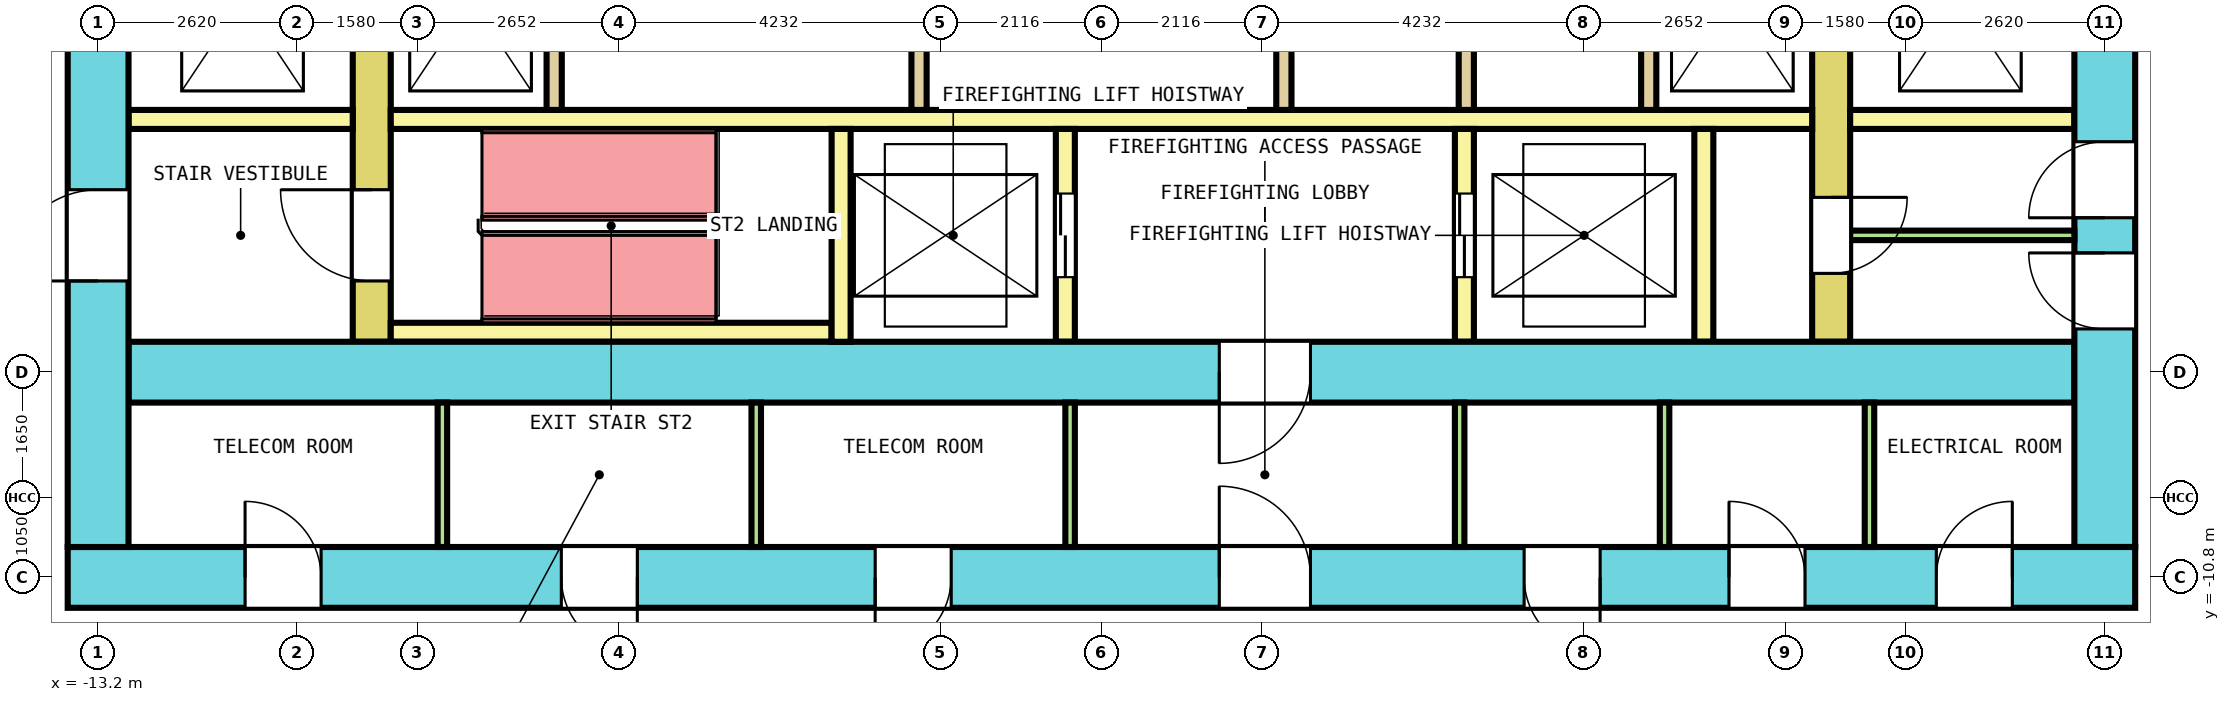
"""IFC4 building model, lengths in metres.
Left out: names, types, materials, properties, quantities, classifications, styles, units other than length and angle.
Written with IfcOpenShell. Run it as: python <this file> out.ifc"""

import sys

from ifc_helpers import new_model, si_unit, direction, frame, frame_2d, origin, place, context, subcontext, project, spatial, rectangle, extrude, element, fill, save


model = new_model("IFC4")
c1 = context("Model", 3, precision=1e-05, world=origin(), true_north=direction((0.0, 1.0)))
c2 = subcontext(c1, "Body", "Model", "MODEL_VIEW")
j1 = project(units=[si_unit("LENGTHUNIT", "METRE"), si_unit("PLANEANGLEUNIT", "RADIAN")], contexts=[c1])
p1 = place(None, origin())
s1 = spatial("IfcSite", under=j1, at=p1, CompositionType="ELEMENT")
p2 = place(p1, origin())
s2 = spatial("IfcBuilding", under=s1, at=p2, CompositionType="ELEMENT")
p3 = place(p2, frame((0.0, 0.0, 89.6)))
s3 = spatial("IfcBuildingStorey", under=s2, at=p3, CompositionType="ELEMENT", Elevation=89.6)
p4 = place(p3, frame((-13.6, -10.8, 0.0), z_axis=(0.0, 0.0, 1.0), x_axis=(1.0, 0.0, 0.0)))
e1 = element("IfcWall", 1, at=p4, inside=s3, PredefinedType="SHEAR", context=c2, shape_type="SweptSolid", body=[
    extrude(rectangle(XDim=27.2, YDim=0.8, at=frame_2d((13.6, 0.0))), origin(), (0.0, 0.0, 1.0), 4.1),
])
p5 = place(p4, frame((2.333, 0.0, 0.0)))
e2 = element("IfcOpeningElement", 2, at=p5, cuts=e1, PredefinedType="OPENING", context=c2, shape_type="SweptSolid", body=[
    extrude(rectangle(XDim=1.0, YDim=2.1, at=frame_2d((0.5, 1.05))), frame((0.0, 0.41, 0.0), z_axis=(0.0, -1.0, 0.0), x_axis=(1.0, 0.0, 0.0)), (0.0, 0.0, 1.0), 0.82),
])
p6 = place(p4, frame((6.494, 0.0, 0.0)))
e3 = element("IfcOpeningElement", 3, at=p6, cuts=e1, PredefinedType="OPENING", context=c2, shape_type="SweptSolid", body=[
    extrude(rectangle(XDim=1.0, YDim=2.1, at=frame_2d((0.5, 1.05))), frame((0.0, 0.41, 0.0), z_axis=(0.0, -1.0, 0.0), x_axis=(1.0, 0.0, 0.0)), (0.0, 0.0, 1.0), 0.82),
])
p7 = place(p4, frame((10.623, 0.0, 0.0)))
e4 = element("IfcOpeningElement", 4, at=p7, cuts=e1, PredefinedType="OPENING", context=c2, shape_type="SweptSolid", body=[
    extrude(rectangle(XDim=1.0, YDim=2.1, at=frame_2d((0.5, 1.05))), frame((0.0, 0.41, 0.0), z_axis=(0.0, -1.0, 0.0), x_axis=(1.0, 0.0, 0.0)), (0.0, 0.0, 1.0), 0.82),
])
p8 = place(p4, frame((19.16, 0.0, 0.0)))
e5 = element("IfcOpeningElement", 5, at=p8, cuts=e1, PredefinedType="OPENING", context=c2, shape_type="SweptSolid", body=[
    extrude(rectangle(XDim=1.0, YDim=2.1, at=frame_2d((0.5, 1.05))), frame((0.0, 0.41, 0.0), z_axis=(0.0, -1.0, 0.0), x_axis=(1.0, 0.0, 0.0)), (0.0, 0.0, 1.0), 0.82),
])
p9 = place(p4, frame((21.856, 0.0, 0.0)))
e6 = element("IfcOpeningElement", 6, at=p9, cuts=e1, PredefinedType="OPENING", context=c2, shape_type="SweptSolid", body=[
    extrude(rectangle(XDim=1.0, YDim=2.1, at=frame_2d((0.5, 1.05))), frame((0.0, 0.41, 0.0), z_axis=(0.0, -1.0, 0.0), x_axis=(1.0, 0.0, 0.0)), (0.0, 0.0, 1.0), 0.82),
])
p10 = place(p4, frame((24.583, 0.0, 0.0)))
e7 = element("IfcOpeningElement", 7, at=p10, cuts=e1, PredefinedType="OPENING", context=c2, shape_type="SweptSolid", body=[
    extrude(rectangle(XDim=1.0, YDim=2.1, at=frame_2d((0.5, 1.05))), frame((0.0, 0.41, 0.0), z_axis=(0.0, -1.0, 0.0), x_axis=(1.0, 0.0, 0.0)), (0.0, 0.0, 1.0), 0.82),
])
p11 = place(p4, frame((15.15, 0.0, 0.0)))
e8 = element("IfcOpeningElement", 8, at=p11, cuts=e1, PredefinedType="OPENING", context=c2, shape_type="SweptSolid", body=[
    extrude(rectangle(XDim=1.2, YDim=2.1, at=frame_2d((0.6, 1.05))), frame((0.0, 0.41, 0.0), z_axis=(0.0, -1.0, 0.0), x_axis=(1.0, 0.0, 0.0)), (0.0, 0.0, 1.0), 0.82),
])
p12 = place(p3, frame((-13.2, -10.4, 0.0), z_axis=(0.0, 0.0, 1.0), x_axis=(0.0, 1.0, 0.0)))
e9 = element("IfcWall", 9, at=p12, inside=s3, PredefinedType="SHEAR", context=c2, shape_type="SweptSolid", body=[
    extrude(rectangle(XDim=20.8, YDim=0.8, at=frame_2d((10.4, 0.0))), origin(), (0.0, 0.0, 1.0), 4.1),
])
p13 = place(p12, frame((9.2, 0.0, 0.0)))
e10 = element("IfcOpeningElement", 10, at=p13, cuts=e9, PredefinedType="OPENING", context=c2, shape_type="SweptSolid", body=[
    extrude(rectangle(XDim=2.4, YDim=2.1, at=frame_2d((1.2, 1.05))), frame((0.0, 0.41, 0.0), z_axis=(0.0, -1.0, 0.0), x_axis=(1.0, 0.0, 0.0)), (0.0, 0.0, 1.0), 0.82),
])
p14 = place(p12, frame((16.1, 0.0, 0.0)))
e11 = element("IfcOpeningElement", 11, at=p14, cuts=e9, PredefinedType="OPENING", context=c2, shape_type="SweptSolid", body=[
    extrude(rectangle(XDim=1.2, YDim=2.1, at=frame_2d((0.6, 1.05))), frame((0.0, 0.41, 0.0), z_axis=(0.0, -1.0, 0.0), x_axis=(1.0, 0.0, 0.0)), (0.0, 0.0, 1.0), 0.82),
])
p15 = place(p12, frame((3.5, 0.0, 0.0)))
e12 = element("IfcOpeningElement", 12, at=p15, cuts=e9, PredefinedType="OPENING", context=c2, shape_type="SweptSolid", body=[
    extrude(rectangle(XDim=1.2, YDim=2.1, at=frame_2d((0.6, 1.05))), frame((0.0, 0.41, 0.0), z_axis=(0.0, -1.0, 0.0), x_axis=(1.0, 0.0, 0.0)), (0.0, 0.0, 1.0), 0.82),
])
p16 = place(p3, frame((13.2, -10.4, 0.0), z_axis=(0.0, 0.0, 1.0), x_axis=(0.0, 1.0, 0.0)))
e13 = element("IfcWall", 13, at=p16, inside=s3, PredefinedType="SHEAR", context=c2, shape_type="SweptSolid", body=[
    extrude(rectangle(XDim=20.8, YDim=0.8, at=frame_2d((10.4, 0.0))), origin(), (0.0, 0.0, 1.0), 4.1),
])
p17 = place(p16, frame((9.2, 0.0, 0.0)))
e14 = element("IfcOpeningElement", 14, at=p17, cuts=e13, PredefinedType="OPENING", context=c2, shape_type="SweptSolid", body=[
    extrude(rectangle(XDim=2.4, YDim=2.1, at=frame_2d((1.2, 1.05))), frame((0.0, 0.41, 0.0), z_axis=(0.0, -1.0, 0.0), x_axis=(1.0, 0.0, 0.0)), (0.0, 0.0, 1.0), 0.82),
])
p18 = place(p16, frame((16.1, 0.0, 0.0)))
e15 = element("IfcOpeningElement", 15, at=p18, cuts=e13, PredefinedType="OPENING", context=c2, shape_type="SweptSolid", body=[
    extrude(rectangle(XDim=1.2, YDim=2.1, at=frame_2d((0.6, 1.05))), frame((0.0, 0.41, 0.0), z_axis=(0.0, -1.0, 0.0), x_axis=(1.0, 0.0, 0.0)), (0.0, 0.0, 1.0), 0.82),
])
p19 = place(p16, frame((2.869, 0.0, 0.0)))
e16 = element("IfcOpeningElement", 16, at=p19, cuts=e13, PredefinedType="OPENING", context=c2, shape_type="SweptSolid", body=[
    extrude(rectangle(XDim=1.0, YDim=2.1, at=frame_2d((0.5, 1.05))), frame((0.0, 0.41, 0.0), z_axis=(0.0, -1.0, 0.0), x_axis=(1.0, 0.0, 0.0)), (0.0, 0.0, 1.0), 0.82),
])
p20 = place(p16, frame((4.331, 0.0, 0.0)))
e17 = element("IfcOpeningElement", 17, at=p20, cuts=e13, PredefinedType="OPENING", context=c2, shape_type="SweptSolid", body=[
    extrude(rectangle(XDim=1.0, YDim=2.1, at=frame_2d((0.5, 1.05))), frame((0.0, 0.41, 0.0), z_axis=(0.0, -1.0, 0.0), x_axis=(1.0, 0.0, 0.0)), (0.0, 0.0, 1.0), 0.82),
])
p21 = place(p3, frame((-12.8, -8.1, 0.0), z_axis=(0.0, 0.0, 1.0), x_axis=(1.0, 0.0, 0.0)))
e18 = element("IfcWall", 18, at=p21, inside=s3, PredefinedType="SHEAR", context=c2, shape_type="SweptSolid", body=[
    extrude(rectangle(XDim=25.6, YDim=0.8, at=frame_2d((12.8, 0.0))), origin(), (0.0, 0.0, 1.0), 4.1),
])
p22 = place(p21, frame((14.35, 0.0, 0.0)))
e19 = element("IfcOpeningElement", 19, at=p22, cuts=e18, PredefinedType="OPENING", context=c2, shape_type="SweptSolid", body=[
    extrude(rectangle(XDim=1.2, YDim=2.1, at=frame_2d((0.6, 1.05))), frame((0.0, 0.41, 0.0), z_axis=(0.0, -1.0, 0.0), x_axis=(1.0, 0.0, 0.0)), (0.0, 0.0, 1.0), 0.82),
])
p23 = place(p3, frame((-9.6, -7.7, 0.0), z_axis=(0.0, 0.0, 1.0), x_axis=(0.0, 1.0, 0.0)))
e20 = element("IfcWall", 20, at=p23, inside=s3, PredefinedType="SHEAR", context=c2, shape_type="SweptSolid", body=[
    extrude(rectangle(XDim=15.4, YDim=0.5, at=frame_2d((7.7, 0.0))), origin(), (0.0, 0.0, 1.0), 4.1),
])
p24 = place(p23, frame((6.5, 0.0, 0.0)))
e21 = element("IfcOpeningElement", 21, at=p24, cuts=e20, PredefinedType="OPENING", context=c2, shape_type="SweptSolid", body=[
    extrude(rectangle(XDim=2.4, YDim=2.1, at=frame_2d((1.2, 1.05))), frame((0.0, 0.26, 0.0), z_axis=(0.0, -1.0, 0.0), x_axis=(1.0, 0.0, 0.0)), (0.0, 0.0, 1.0), 0.52),
])
p25 = place(p23, frame((13.4, 0.0, 0.0)))
e22 = element("IfcOpeningElement", 22, at=p25, cuts=e20, PredefinedType="OPENING", context=c2, shape_type="SweptSolid", body=[
    extrude(rectangle(XDim=1.2, YDim=2.1, at=frame_2d((0.6, 1.05))), frame((0.0, 0.26, 0.0), z_axis=(0.0, -1.0, 0.0), x_axis=(1.0, 0.0, 0.0)), (0.0, 0.0, 1.0), 0.52),
])
p26 = place(p23, frame((0.8, 0.0, 0.0)))
e23 = element("IfcOpeningElement", 23, at=p26, cuts=e20, PredefinedType="OPENING", context=c2, shape_type="SweptSolid", body=[
    extrude(rectangle(XDim=1.2, YDim=2.1, at=frame_2d((0.6, 1.05))), frame((0.0, 0.26, 0.0), z_axis=(0.0, -1.0, 0.0), x_axis=(1.0, 0.0, 0.0)), (0.0, 0.0, 1.0), 0.52),
])
p27 = place(p3, frame((9.6, -7.7, 0.0), z_axis=(0.0, 0.0, 1.0), x_axis=(0.0, 1.0, 0.0)))
e24 = element("IfcWall", 24, at=p27, inside=s3, PredefinedType="SHEAR", context=c2, shape_type="SweptSolid", body=[
    extrude(rectangle(XDim=15.4, YDim=0.5, at=frame_2d((7.7, 0.0))), origin(), (0.0, 0.0, 1.0), 4.1),
])
p28 = place(p27, frame((6.5, 0.0, 0.0)))
e25 = element("IfcOpeningElement", 25, at=p28, cuts=e24, PredefinedType="OPENING", context=c2, shape_type="SweptSolid", body=[
    extrude(rectangle(XDim=2.4, YDim=2.1, at=frame_2d((1.2, 1.05))), frame((0.0, 0.26, 0.0), z_axis=(0.0, -1.0, 0.0), x_axis=(1.0, 0.0, 0.0)), (0.0, 0.0, 1.0), 0.52),
])
p29 = place(p27, frame((13.4, 0.0, 0.0)))
e26 = element("IfcOpeningElement", 26, at=p29, cuts=e24, PredefinedType="OPENING", context=c2, shape_type="SweptSolid", body=[
    extrude(rectangle(XDim=1.2, YDim=2.1, at=frame_2d((0.6, 1.05))), frame((0.0, 0.26, 0.0), z_axis=(0.0, -1.0, 0.0), x_axis=(1.0, 0.0, 0.0)), (0.0, 0.0, 1.0), 0.52),
])
p30 = place(p27, frame((0.9, 0.0, 0.0)))
e27 = element("IfcOpeningElement", 27, at=p30, cuts=e24, PredefinedType="OPENING", context=c2, shape_type="SweptSolid", body=[
    extrude(rectangle(XDim=1.0, YDim=2.1, at=frame_2d((0.5, 1.05))), frame((0.0, 0.26, 0.0), z_axis=(0.0, -1.0, 0.0), x_axis=(1.0, 0.0, 0.0)), (0.0, 0.0, 1.0), 0.52),
])
p31 = place(p3, frame((-12.8, -4.775, 0.0), z_axis=(0.0, 0.0, 1.0), x_axis=(1.0, 0.0, 0.0)))
e28 = element("IfcWall", 28, at=p31, inside=s3, PredefinedType="SOLIDWALL", context=c2, shape_type="SweptSolid", body=[
    extrude(rectangle(XDim=2.95, YDim=0.25, at=frame_2d((1.475, 0.0))), origin(), (0.0, 0.0, 1.0), 4.1),
])
p32 = place(p3, frame((-9.35, -4.775, 0.0), z_axis=(0.0, 0.0, 1.0), x_axis=(1.0, 0.0, 0.0)))
e29 = element("IfcWall", 29, at=p32, inside=s3, PredefinedType="SOLIDWALL", context=c2, shape_type="SweptSolid", body=[
    extrude(rectangle(XDim=18.7, YDim=0.25, at=frame_2d((9.35, 0.0))), origin(), (0.0, 0.0, 1.0), 4.1),
])
p33 = place(p3, frame((9.85, -4.775, 0.0), z_axis=(0.0, 0.0, 1.0), x_axis=(1.0, 0.0, 0.0)))
e30 = element("IfcWall", 30, at=p33, inside=s3, PredefinedType="SOLIDWALL", context=c2, shape_type="SweptSolid", body=[
    extrude(rectangle(XDim=2.95, YDim=0.25, at=frame_2d((1.475, 0.0))), origin(), (0.0, 0.0, 1.0), 4.1),
])
for number, where, z_axis, x_axis in (
    (31, (-7.2, -4.65, 0.0), (0.0, 0.0, 1.0), (0.0, 1.0, 0.0)),
    (32, (-2.4, -4.65, 0.0), (0.0, 0.0, 1.0), (0.0, 1.0, 0.0)),
    (33, (2.4, -4.65, 0.0), (0.0, 0.0, 1.0), (0.0, 1.0, 0.0)),
    (34, (4.8, -4.65, 0.0), (0.0, 0.0, 1.0), (0.0, 1.0, 0.0)),
    (35, (7.2, -4.65, 0.0), (0.0, 0.0, 1.0), (0.0, 1.0, 0.0)),
):
    element("IfcWall", number, at=place(p3, frame(where, z_axis=z_axis, x_axis=x_axis)), inside=s3, PredefinedType="SOLIDWALL", context=c2, shape_type="SweptSolid", body=[
        extrude(rectangle(XDim=2.9, YDim=0.2, at=frame_2d((1.45, 0.0))), origin(), (0.0, 0.0, 1.0), 4.1),
    ])
p34 = place(p3, frame((-9.35, -7.575, 0.0), z_axis=(0.0, 0.0, 1.0), x_axis=(1.0, 0.0, 0.0)))
e36 = element("IfcWall", 36, at=p34, inside=s3, PredefinedType="SOLIDWALL", context=c2, shape_type="SweptSolid", body=[
    extrude(rectangle(XDim=5.8, YDim=0.25, at=frame_2d((2.9, 0.0))), origin(), (0.0, 0.0, 1.0), 4.1),
])
p35 = place(p3, frame((-3.425, -7.7, 0.0), z_axis=(0.0, 0.0, 1.0), x_axis=(0.0, 1.0, 0.0)))
e37 = element("IfcWall", 37, at=p35, inside=s3, PredefinedType="SOLIDWALL", context=c2, shape_type="SweptSolid", body=[
    extrude(rectangle(XDim=2.8, YDim=0.25, at=frame_2d((1.4, 0.0))), origin(), (0.0, 0.0, 1.0), 4.1),
])
p36 = place(p3, frame((-0.475, -7.7, 0.0), z_axis=(0.0, 0.0, 1.0), x_axis=(0.0, 1.0, 0.0)))
e38 = element("IfcWall", 38, at=p36, inside=s3, PredefinedType="SOLIDWALL", context=c2, shape_type="SweptSolid", body=[
    extrude(rectangle(XDim=2.8, YDim=0.25, at=frame_2d((1.4, 0.0))), origin(), (0.0, 0.0, 1.0), 4.1),
])
p37 = place(p36, frame((0.85, 0.0, 0.0)))
e39 = element("IfcOpeningElement", 39, at=p37, cuts=e38, PredefinedType="OPENING", context=c2, shape_type="SweptSolid", body=[
    extrude(rectangle(XDim=1.1, YDim=2.1, at=frame_2d((0.55, 1.05))), frame((0.0, 0.135, 0.0), z_axis=(0.0, -1.0, 0.0), x_axis=(1.0, 0.0, 0.0)), (0.0, 0.0, 1.0), 0.27),
])
p38 = place(p3, frame((4.775, -7.7, 0.0), z_axis=(0.0, 0.0, 1.0), x_axis=(0.0, 1.0, 0.0)))
e40 = element("IfcWall", 40, at=p38, inside=s3, PredefinedType="SOLIDWALL", context=c2, shape_type="SweptSolid", body=[
    extrude(rectangle(XDim=2.8, YDim=0.25, at=frame_2d((1.4, 0.0))), origin(), (0.0, 0.0, 1.0), 4.1),
])
p39 = place(p38, frame((0.85, 0.0, 0.0)))
e41 = element("IfcOpeningElement", 41, at=p39, cuts=e40, PredefinedType="OPENING", context=c2, shape_type="SweptSolid", body=[
    extrude(rectangle(XDim=1.1, YDim=2.1, at=frame_2d((0.55, 1.05))), frame((0.0, 0.135, 0.0), z_axis=(0.0, -1.0, 0.0), x_axis=(1.0, 0.0, 0.0)), (0.0, 0.0, 1.0), 0.27),
])
p40 = place(p3, frame((7.925, -7.7, 0.0), z_axis=(0.0, 0.0, 1.0), x_axis=(0.0, 1.0, 0.0)))
e42 = element("IfcWall", 42, at=p40, inside=s3, PredefinedType="SOLIDWALL", context=c2, shape_type="SweptSolid", body=[
    extrude(rectangle(XDim=2.8, YDim=0.25, at=frame_2d((1.4, 0.0))), origin(), (0.0, 0.0, 1.0), 4.1),
])
p41 = place(p3, frame((9.85, -6.3, 0.0), z_axis=(0.0, 0.0, 1.0), x_axis=(1.0, 0.0, 0.0)))
e43 = element("IfcWall", 43, at=p41, inside=s3, PredefinedType="PARTITIONING", context=c2, shape_type="SweptSolid", body=[
    extrude(rectangle(XDim=2.95, YDim=0.125, at=frame_2d((1.475, 0.0))), origin(), (0.0, 0.0, 1.0), 4.1),
])
for number, where, z_axis, x_axis in (
    (44, (-8.671, -10.4, 0.0), (0.0, 0.0, 1.0), (0.0, 1.0, 0.0)),
    (45, (-4.542, -10.4, 0.0), (0.0, 0.0, 1.0), (0.0, 1.0, 0.0)),
    (46, (-0.413, -10.4, 0.0), (0.0, 0.0, 1.0), (0.0, 1.0, 0.0)),
    (47, (4.712, -10.4, 0.0), (0.0, 0.0, 1.0), (0.0, 1.0, 0.0)),
    (48, (7.408, -10.4, 0.0), (0.0, 0.0, 1.0), (0.0, 1.0, 0.0)),
    (49, (10.104, -10.4, 0.0), (0.0, 0.0, 1.0), (0.0, 1.0, 0.0)),
):
    element("IfcWall", number, at=place(p3, frame(where, z_axis=z_axis, x_axis=x_axis)), inside=s3, PredefinedType="PARTITIONING", context=c2, shape_type="SweptSolid", body=[
        extrude(rectangle(XDim=1.9, YDim=0.125, at=frame_2d((0.95, 0.0))), origin(), (0.0, 0.0, 1.0), 4.1),
    ])
p42 = place(p37, origin())
e50 = element("IfcDoor", 50, at=p42, inside=s3, OperationType="DOUBLE_DOOR_SLIDING", PredefinedType="DOOR", context=c2, shape_type="SweptSolid", body=[
    extrude(rectangle(XDim=1.1, YDim=2.1, at=frame_2d((0.55, 1.05))), frame((0.0, 0.075, 0.0), z_axis=(0.0, -1.0, 0.0), x_axis=(1.0, 0.0, 0.0)), (0.0, 0.0, 1.0), 0.15),
])
fill(e39, e50)
p43 = place(p39, origin())
e51 = element("IfcDoor", 51, at=p43, inside=s3, OperationType="DOUBLE_DOOR_SLIDING", PredefinedType="DOOR", context=c2, shape_type="SweptSolid", body=[
    extrude(rectangle(XDim=1.1, YDim=2.1, at=frame_2d((0.55, 1.05))), frame((0.0, 0.075, 0.0), z_axis=(0.0, -1.0, 0.0), x_axis=(1.0, 0.0, 0.0)), (0.0, 0.0, 1.0), 0.15),
])
fill(e41, e51)
p44 = place(p26, origin())
e52 = element("IfcDoor", 52, at=p44, inside=s3, OperationType="SINGLE_SWING_LEFT", PredefinedType="DOOR", context=c2, shape_type="SweptSolid", body=[
    extrude(rectangle(XDim=1.2, YDim=2.1, at=frame_2d((0.6, 1.05))), frame((0.0, 0.2, 0.0), z_axis=(0.0, -1.0, 0.0), x_axis=(1.0, 0.0, 0.0)), (0.0, 0.0, 1.0), 0.4),
])
fill(e23, e52)
p45 = place(p15, origin())
e53 = element("IfcDoor", 53, at=p45, inside=s3, OperationType="SINGLE_SWING_RIGHT", PredefinedType="DOOR", context=c2, shape_type="SweptSolid", body=[
    extrude(rectangle(XDim=1.2, YDim=2.1, at=frame_2d((0.6, 1.05))), frame((0.0, 0.3, 0.0), z_axis=(0.0, -1.0, 0.0), x_axis=(1.0, 0.0, 0.0)), (0.0, 0.0, 1.0), 0.6),
])
fill(e12, e53)
p46 = place(p22, origin())
e54 = element("IfcDoor", 54, at=p46, inside=s3, OperationType="SINGLE_SWING_LEFT", PredefinedType="DOOR", context=c2, shape_type="SweptSolid", body=[
    extrude(rectangle(XDim=1.2, YDim=2.1, at=frame_2d((0.6, 1.05))), frame((0.0, 0.3, 0.0), z_axis=(0.0, -1.0, 0.0), x_axis=(1.0, 0.0, 0.0)), (0.0, 0.0, 1.0), 0.6),
])
fill(e19, e54)
p47 = place(p30, origin())
e55 = element("IfcDoor", 55, at=p47, inside=s3, OperationType="SINGLE_SWING_LEFT", PredefinedType="DOOR", context=c2, shape_type="SweptSolid", body=[
    extrude(rectangle(XDim=1.0, YDim=2.1, at=frame_2d((0.5, 1.05))), frame((0.0, 0.2, 0.0), z_axis=(0.0, -1.0, 0.0), x_axis=(1.0, 0.0, 0.0)), (0.0, 0.0, 1.0), 0.4),
])
fill(e27, e55)
p48 = place(p19, origin())
e56 = element("IfcDoor", 56, at=p48, inside=s3, OperationType="SINGLE_SWING_RIGHT", PredefinedType="DOOR", context=c2, shape_type="SweptSolid", body=[
    extrude(rectangle(XDim=1.0, YDim=2.1, at=frame_2d((0.5, 1.05))), frame((0.0, 0.3, 0.0), z_axis=(0.0, -1.0, 0.0), x_axis=(1.0, 0.0, 0.0)), (0.0, 0.0, 1.0), 0.6),
])
fill(e16, e56)
p49 = place(p20, origin())
e57 = element("IfcDoor", 57, at=p49, inside=s3, OperationType="SINGLE_SWING_LEFT", PredefinedType="DOOR", context=c2, shape_type="SweptSolid", body=[
    extrude(rectangle(XDim=1.0, YDim=2.1, at=frame_2d((0.5, 1.05))), frame((0.0, 0.3, 0.0), z_axis=(0.0, -1.0, 0.0), x_axis=(1.0, 0.0, 0.0)), (0.0, 0.0, 1.0), 0.6),
])
fill(e17, e57)
p50 = place(p5, origin())
e58 = element("IfcDoor", 58, at=p50, inside=s3, OperationType="SINGLE_SWING_RIGHT", PredefinedType="DOOR", context=c2, shape_type="SweptSolid", body=[
    extrude(rectangle(XDim=1.0, YDim=2.1, at=frame_2d((0.5, 1.05))), frame((0.0, 0.3, 0.0), z_axis=(0.0, -1.0, 0.0), x_axis=(1.0, 0.0, 0.0)), (0.0, 0.0, 1.0), 0.6),
])
fill(e2, e58)
p51 = place(p6, origin())
e59 = element("IfcDoor", 59, at=p51, inside=s3, OperationType="SINGLE_SWING_LEFT", PredefinedType="DOOR", context=c2, shape_type="SweptSolid", body=[
    extrude(rectangle(XDim=1.0, YDim=2.1, at=frame_2d((0.5, 1.05))), frame((0.0, 0.3, 0.0), z_axis=(0.0, -1.0, 0.0), x_axis=(1.0, 0.0, 0.0)), (0.0, 0.0, 1.0), 0.6),
])
fill(e3, e59)
p52 = place(p7, origin())
e60 = element("IfcDoor", 60, at=p52, inside=s3, OperationType="SINGLE_SWING_RIGHT", PredefinedType="DOOR", context=c2, shape_type="SweptSolid", body=[
    extrude(rectangle(XDim=1.0, YDim=2.1, at=frame_2d((0.5, 1.05))), frame((0.0, 0.3, 0.0), z_axis=(0.0, -1.0, 0.0), x_axis=(1.0, 0.0, 0.0)), (0.0, 0.0, 1.0), 0.6),
])
fill(e4, e60)
p53 = place(p8, origin())
e61 = element("IfcDoor", 61, at=p53, inside=s3, OperationType="SINGLE_SWING_LEFT", PredefinedType="DOOR", context=c2, shape_type="SweptSolid", body=[
    extrude(rectangle(XDim=1.0, YDim=2.1, at=frame_2d((0.5, 1.05))), frame((0.0, 0.3, 0.0), z_axis=(0.0, -1.0, 0.0), x_axis=(1.0, 0.0, 0.0)), (0.0, 0.0, 1.0), 0.6),
])
fill(e5, e61)
p54 = place(p9, origin())
e62 = element("IfcDoor", 62, at=p54, inside=s3, OperationType="SINGLE_SWING_RIGHT", PredefinedType="DOOR", context=c2, shape_type="SweptSolid", body=[
    extrude(rectangle(XDim=1.0, YDim=2.1, at=frame_2d((0.5, 1.05))), frame((0.0, 0.3, 0.0), z_axis=(0.0, -1.0, 0.0), x_axis=(1.0, 0.0, 0.0)), (0.0, 0.0, 1.0), 0.6),
])
fill(e6, e62)
p55 = place(p10, origin())
e63 = element("IfcDoor", 63, at=p55, inside=s3, OperationType="SINGLE_SWING_LEFT", PredefinedType="DOOR", context=c2, shape_type="SweptSolid", body=[
    extrude(rectangle(XDim=1.0, YDim=2.1, at=frame_2d((0.5, 1.05))), frame((0.0, 0.3, 0.0), z_axis=(0.0, -1.0, 0.0), x_axis=(1.0, 0.0, 0.0)), (0.0, 0.0, 1.0), 0.6),
])
fill(e7, e63)
p56 = place(p11, origin())
e64 = element("IfcDoor", 64, at=p56, inside=s3, OperationType="SINGLE_SWING_RIGHT", PredefinedType="DOOR", context=c2, shape_type="SweptSolid", body=[
    extrude(rectangle(XDim=1.2, YDim=2.1, at=frame_2d((0.6, 1.05))), frame((0.0, 0.3, 0.0), z_axis=(0.0, -1.0, 0.0), x_axis=(1.0, 0.0, 0.0)), (0.0, 0.0, 1.0), 0.6),
])
fill(e8, e64)
save(model, sys.argv[1])
